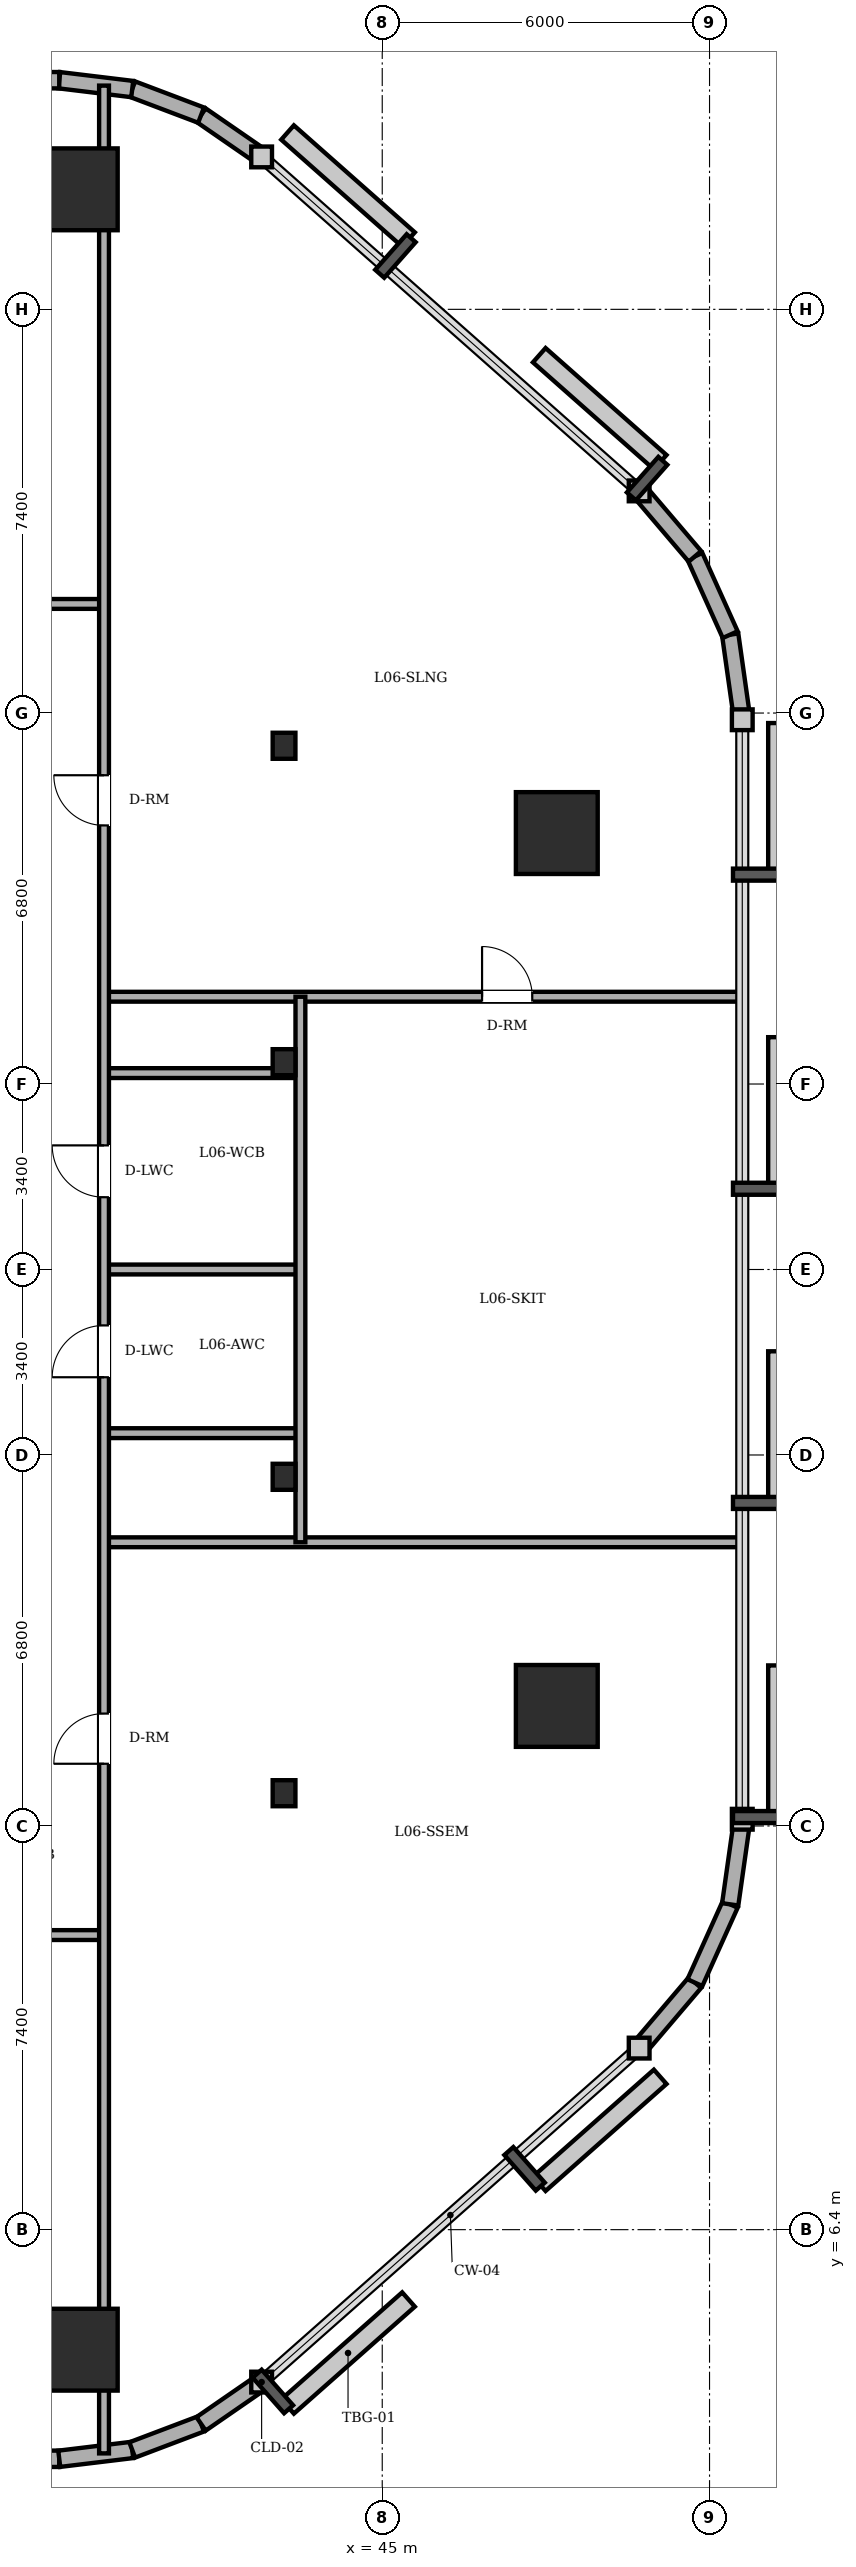
"""IFC4 building model, lengths in metres.
Left out: names, types, materials, properties, quantities, classifications, styles, units other than length and angle.
Written with IfcOpenShell. Run it as: python <this file> out.ifc"""

import sys

from ifc_helpers import new_model, si_unit, direction, frame, frame_2d, origin, origin_2d, place, context, subcontext, project, spatial, rectangle, circle, i_section, extrude, element, fill, save


model = new_model("IFC4")
c1 = context("Model", 3, precision=1e-05, world=origin(), true_north=direction((0.0, 1.0)))
c2 = subcontext(c1, "Body", "Model", "MODEL_VIEW")
j1 = project(units=[si_unit("LENGTHUNIT", "METRE"), si_unit("PLANEANGLEUNIT", "RADIAN")], contexts=[c1])
p1 = place(None, origin())
s1 = spatial("IfcSite", under=j1, at=p1, CompositionType="ELEMENT")
p2 = place(p1, origin())
s2 = spatial("IfcBuilding", under=s1, at=p2, CompositionType="ELEMENT")
p3 = place(p2, frame((0.0, 0.0, 24.0)))
s3 = spatial("IfcBuildingStorey", under=s2, at=p3, CompositionType="ELEMENT", Elevation=24.0)
for number, where, z_axis, x_axis in (
    (1, (39.4, 4.2, 0.0), (0.0, 0.0, 1.0), (1.0, 0.0, 0.0)),
    (2, (48.2, 16.0, 0.0), (0.0, 0.0, 1.0), (1.0, 0.0, 0.0)),
    (3, (48.2, 32.0, 0.0), (0.0, 0.0, 1.0), (1.0, 0.0, 0.0)),
    (4, (39.4, 43.8, 0.0), (0.0, 0.0, 1.0), (1.0, 0.0, 0.0)),
):
    element("IfcColumn", number, at=place(p3, frame(where, z_axis=z_axis, x_axis=x_axis)), inside=s3, PredefinedType="COLUMN", context=c2, shape_type="SweptSolid", body=[
        extrude(circle(Radius=0.75, at=origin_2d()), origin(), (0.0, 0.0, 1.0), 4.8),
    ])
for number, where, z_axis, x_axis in (
    (5, (43.2, 14.4, 0.0), (0.0, 0.0, 1.0), (1.0, 0.0, 0.0)),
    (6, (43.2, 20.2, 0.0), (0.0, 0.0, 1.0), (1.0, 0.0, 0.0)),
    (7, (43.2, 27.8, 0.0), (0.0, 0.0, 1.0), (1.0, 0.0, 0.0)),
    (8, (43.2, 33.6, 0.0), (0.0, 0.0, 1.0), (1.0, 0.0, 0.0)),
):
    element("IfcColumn", number, at=place(p3, frame(where, z_axis=z_axis, x_axis=x_axis)), inside=s3, PredefinedType="COLUMN", context=c2, shape_type="SweptSolid", body=[
        extrude(i_section(OverallWidth=0.417, OverallDepth=0.477, WebThickness=0.036, FlangeThickness=0.057, FilletRadius=0.015, at=origin_2d()), origin(), (0.0, 0.0, 1.0), 4.8),
    ])
p4 = place(p3, frame((9.0, 2.2, 0.0), z_axis=(0.0, 0.0, 1.0), x_axis=(1.0, 0.0, 0.0)))
e9 = element("IfcWall", 9, at=p4, inside=s3, PredefinedType="SOLIDWALL", context=c2, shape_type="SweptSolid", body=[
    extrude(rectangle(XDim=30.079, YDim=0.3, at=frame_2d((15.04, 0.0))), origin(), (0.0, 0.0, 1.0), 4.6),
])
p5 = place(p4, frame((8.537, 0.0, 0.0)))
e10 = element("IfcOpeningElement", 10, at=p5, cuts=e9, PredefinedType="OPENING", context=c2, shape_type="SweptSolid", body=[
    extrude(rectangle(XDim=0.95, YDim=2.2, at=frame_2d((0.475, 1.1))), frame((0.0, 0.16, 0.0), z_axis=(0.0, -1.0, 0.0), x_axis=(1.0, 0.0, 0.0)), (0.0, 0.0, 1.0), 0.32),
])
p6 = place(p4, frame((18.736, 0.0, 0.85)))
e11 = element("IfcOpeningElement", 11, at=p6, cuts=e9, PredefinedType="OPENING", context=c2, shape_type="SweptSolid", body=[
    extrude(rectangle(XDim=2.4, YDim=2.1, at=frame_2d((1.2, 1.05))), frame((0.0, 0.16, 0.0), z_axis=(0.0, -1.0, 0.0), x_axis=(1.0, 0.0, 0.0)), (0.0, 0.0, 1.0), 0.32),
])
p7 = place(p3, frame((39.079, 2.2, 0.0), z_axis=(0.0, 0.0, 1.0), x_axis=(0.992739027259, 0.120288086515, 0.0)))
e12 = element("IfcWall", 12, at=p7, inside=s3, PredefinedType="SOLIDWALL", context=c2, shape_type="SweptSolid", body=[
    extrude(rectangle(XDim=1.348, YDim=0.3, at=frame_2d((0.674, 0.0))), origin(), (0.0, 0.0, 1.0), 4.6),
])
p8 = place(p3, frame((40.417, 2.362, 0.0), z_axis=(0.0, 0.0, 1.0), x_axis=(0.935156721165, 0.354234254216, 0.0)))
e13 = element("IfcWall", 13, at=p8, inside=s3, PredefinedType="SOLIDWALL", context=c2, shape_type="SweptSolid", body=[
    extrude(rectangle(XDim=1.349, YDim=0.3, at=frame_2d((0.675, 0.0))), origin(), (0.0, 0.0, 1.0), 4.6),
])
p9 = place(p3, frame((41.679, 2.84, 0.0), z_axis=(0.0, 0.0, 1.0), x_axis=(0.823116500192, 0.567872544777, 0.0)))
e14 = element("IfcWall", 14, at=p9, inside=s3, PredefinedType="SOLIDWALL", context=c2, shape_type="SweptSolid", body=[
    extrude(rectangle(XDim=1.349, YDim=0.3, at=frame_2d((0.674, 0.0))), origin(), (0.0, 0.0, 1.0), 4.6),
])
p10 = place(p3, frame((49.71, 9.728, 0.0), z_axis=(0.0, 0.0, 1.0), x_axis=(0.648389989909, 0.7613083613, 0.0)))
e15 = element("IfcWall", 15, at=p10, inside=s3, PredefinedType="SOLIDWALL", context=c2, shape_type="SweptSolid", body=[
    extrude(rectangle(XDim=1.576, YDim=0.3, at=frame_2d((0.788, 0.0))), origin(), (0.0, 0.0, 1.0), 4.6),
])
p11 = place(p3, frame((50.732, 10.928, 0.0), z_axis=(0.0, 0.0, 1.0), x_axis=(0.410996558744, 0.911636895206, 0.0)))
e16 = element("IfcWall", 16, at=p11, inside=s3, PredefinedType="SOLIDWALL", context=c2, shape_type="SweptSolid", body=[
    extrude(rectangle(XDim=1.574, YDim=0.3, at=frame_2d((0.787, 0.0))), origin(), (0.0, 0.0, 1.0), 4.6),
])
for number, where, z_axis, x_axis in (
    (17, (51.379, 12.363, 0.0), (0.0, 0.0, 1.0), (0.14, 0.99, 0.0)),
    (18, (51.6, 34.077, 0.0), (0.0, 0.0, 1.0), (-0.14, 0.99, 0.0)),
):
    element("IfcWall", number, at=place(p3, frame(where, z_axis=z_axis, x_axis=x_axis)), inside=s3, PredefinedType="SOLIDWALL", context=c2, shape_type="SweptSolid", body=[
        extrude(rectangle(XDim=1.576, YDim=0.3, at=frame_2d((0.788, 0.0))), origin(), (0.0, 0.0, 1.0), 4.6),
    ])
p12 = place(p3, frame((51.379, 35.637, 0.0), z_axis=(0.0, 0.0, 1.0), x_axis=(-0.410996558744, 0.911636895206, 0.0)))
e19 = element("IfcWall", 19, at=p12, inside=s3, PredefinedType="SOLIDWALL", context=c2, shape_type="SweptSolid", body=[
    extrude(rectangle(XDim=1.574, YDim=0.3, at=frame_2d((0.787, 0.0))), origin(), (0.0, 0.0, 1.0), 4.6),
])
p13 = place(p3, frame((50.732, 37.072, 0.0), z_axis=(0.0, 0.0, 1.0), x_axis=(-0.648389989909, 0.7613083613, 0.0)))
e20 = element("IfcWall", 20, at=p13, inside=s3, PredefinedType="SOLIDWALL", context=c2, shape_type="SweptSolid", body=[
    extrude(rectangle(XDim=1.576, YDim=0.3, at=frame_2d((0.788, 0.0))), origin(), (0.0, 0.0, 1.0), 4.6),
])
p14 = place(p3, frame((42.789, 44.394, 0.0), z_axis=(0.0, 0.0, 1.0), x_axis=(-0.823116500192, 0.567872544777, 0.0)))
e21 = element("IfcWall", 21, at=p14, inside=s3, PredefinedType="SOLIDWALL", context=c2, shape_type="SweptSolid", body=[
    extrude(rectangle(XDim=1.349, YDim=0.3, at=frame_2d((0.674, 0.0))), origin(), (0.0, 0.0, 1.0), 4.6),
])
p15 = place(p3, frame((41.679, 45.16, 0.0), z_axis=(0.0, 0.0, 1.0), x_axis=(-0.935156721165, 0.354234254216, 0.0)))
e22 = element("IfcWall", 22, at=p15, inside=s3, PredefinedType="SOLIDWALL", context=c2, shape_type="SweptSolid", body=[
    extrude(rectangle(XDim=1.349, YDim=0.3, at=frame_2d((0.675, 0.0))), origin(), (0.0, 0.0, 1.0), 4.6),
])
p16 = place(p3, frame((40.417, 45.638, 0.0), z_axis=(0.0, 0.0, 1.0), x_axis=(-0.992739027259, 0.120288086515, 0.0)))
e23 = element("IfcWall", 23, at=p16, inside=s3, PredefinedType="SOLIDWALL", context=c2, shape_type="SweptSolid", body=[
    extrude(rectangle(XDim=1.348, YDim=0.3, at=frame_2d((0.674, 0.0))), origin(), (0.0, 0.0, 1.0), 4.6),
])
p17 = place(p3, frame((39.079, 45.8, 0.0), z_axis=(0.0, 0.0, 1.0), x_axis=(-1.0, 0.0, 0.0)))
e24 = element("IfcWall", 24, at=p17, inside=s3, PredefinedType="SOLIDWALL", context=c2, shape_type="SweptSolid", body=[
    extrude(rectangle(XDim=30.079, YDim=0.3, at=frame_2d((15.04, 0.0))), origin(), (0.0, 0.0, 1.0), 4.6),
])
p18 = place(p17, frame((23.717, 0.0, 0.0)))
e25 = element("IfcOpeningElement", 25, at=p18, cuts=e24, PredefinedType="OPENING", context=c2, shape_type="SweptSolid", body=[
    extrude(rectangle(XDim=0.95, YDim=2.2, at=frame_2d((0.475, 1.1))), frame((0.0, 0.16, 0.0), z_axis=(0.0, -1.0, 0.0), x_axis=(1.0, 0.0, 0.0)), (0.0, 0.0, 1.0), 0.32),
])
p19 = place(p17, frame((8.943, 0.0, 0.85)))
e26 = element("IfcOpeningElement", 26, at=p19, cuts=e24, PredefinedType="OPENING", context=c2, shape_type="SweptSolid", body=[
    extrude(rectangle(XDim=2.4, YDim=2.1, at=frame_2d((1.2, 1.05))), frame((0.0, 0.16, 0.0), z_axis=(0.0, -1.0, 0.0), x_axis=(1.0, 0.0, 0.0)), (0.0, 0.0, 1.0), 0.32),
])
p20 = place(p17, frame((18.736, 0.0, 0.85)))
e27 = element("IfcOpeningElement", 27, at=p20, cuts=e24, PredefinedType="OPENING", context=c2, shape_type="SweptSolid", body=[
    extrude(rectangle(XDim=2.4, YDim=2.1, at=frame_2d((1.2, 1.05))), frame((0.0, 0.16, 0.0), z_axis=(0.0, -1.0, 0.0), x_axis=(1.0, 0.0, 0.0)), (0.0, 0.0, 1.0), 0.32),
])
p21 = place(p3, frame((11.0, 11.8, 0.0), z_axis=(0.0, 0.0, 1.0), x_axis=(1.0, 0.0, 0.0)))
e28 = element("IfcWall", 28, at=p21, inside=s3, PredefinedType="PARTITIONING", context=c2, shape_type="SweptSolid", body=[
    extrude(rectangle(XDim=28.9, YDim=0.18, at=frame_2d((14.45, 0.0))), origin(), (0.0, 0.0, 1.0), 4.6),
])
p22 = place(p21, frame((18.05, 0.0, 0.0)))
e29 = element("IfcOpeningElement", 29, at=p22, cuts=e28, PredefinedType="OPENING", context=c2, shape_type="SweptSolid", body=[
    extrude(rectangle(XDim=0.9, YDim=2.05, at=frame_2d((0.45, 1.025))), frame((0.0, 0.1, 0.0), z_axis=(0.0, -1.0, 0.0), x_axis=(1.0, 0.0, 0.0)), (0.0, 0.0, 1.0), 0.2),
])
p23 = place(p3, frame((39.9, 19.0, 0.0), z_axis=(0.0, 0.0, 1.0), x_axis=(1.0, 0.0, 0.0)))
e30 = element("IfcWall", 30, at=p23, inside=s3, PredefinedType="PARTITIONING", context=c2, shape_type="SweptSolid", body=[
    extrude(rectangle(XDim=11.7, YDim=0.18, at=frame_2d((5.85, 0.0))), origin(), (0.0, 0.0, 1.0), 4.6),
])
p24 = place(p3, frame((39.9, 21.0, 0.0), z_axis=(0.0, 0.0, 1.0), x_axis=(1.0, 0.0, 0.0)))
e31 = element("IfcWall", 31, at=p24, inside=s3, PredefinedType="PARTITIONING", context=c2, shape_type="SweptSolid", body=[
    extrude(rectangle(XDim=3.6, YDim=0.18, at=frame_2d((1.8, 0.0))), origin(), (0.0, 0.0, 1.0), 4.312),
])
p25 = place(p3, frame((39.9, 24.0, 0.0), z_axis=(0.0, 0.0, 1.0), x_axis=(1.0, 0.0, 0.0)))
e32 = element("IfcWall", 32, at=p25, inside=s3, PredefinedType="PARTITIONING", context=c2, shape_type="SweptSolid", body=[
    extrude(rectangle(XDim=3.6, YDim=0.18, at=frame_2d((1.8, 0.0))), origin(), (0.0, 0.0, 1.0), 4.252),
])
p26 = place(p3, frame((39.9, 27.6, 0.0), z_axis=(0.0, 0.0, 1.0), x_axis=(1.0, 0.0, 0.0)))
e33 = element("IfcWall", 33, at=p26, inside=s3, PredefinedType="PARTITIONING", context=c2, shape_type="SweptSolid", body=[
    extrude(rectangle(XDim=3.6, YDim=0.18, at=frame_2d((1.8, 0.0))), origin(), (0.0, 0.0, 1.0), 3.982),
])
p27 = place(p3, frame((39.9, 29.0, 0.0), z_axis=(0.0, 0.0, 1.0), x_axis=(1.0, 0.0, 0.0)))
e34 = element("IfcWall", 34, at=p27, inside=s3, PredefinedType="PARTITIONING", context=c2, shape_type="SweptSolid", body=[
    extrude(rectangle(XDim=11.7, YDim=0.18, at=frame_2d((5.85, 0.0))), origin(), (0.0, 0.0, 1.0), 4.6),
])
p28 = place(p27, frame((6.93, 0.0, 0.0)))
e35 = element("IfcOpeningElement", 35, at=p28, cuts=e34, PredefinedType="OPENING", context=c2, shape_type="SweptSolid", body=[
    extrude(rectangle(XDim=0.92, YDim=2.1, at=frame_2d((0.46, 1.05))), frame((0.0, 0.1, 0.0), z_axis=(0.0, -1.0, 0.0), x_axis=(1.0, 0.0, 0.0)), (0.0, 0.0, 1.0), 0.2),
])
p29 = place(p3, frame((11.0, 36.2, 0.0), z_axis=(0.0, 0.0, 1.0), x_axis=(1.0, 0.0, 0.0)))
e36 = element("IfcWall", 36, at=p29, inside=s3, PredefinedType="PARTITIONING", context=c2, shape_type="SweptSolid", body=[
    extrude(rectangle(XDim=28.9, YDim=0.18, at=frame_2d((14.45, 0.0))), origin(), (0.0, 0.0, 1.0), 4.6),
])
p30 = place(p3, frame((39.9, 2.299, 0.0), z_axis=(0.0, 0.0, 1.0), x_axis=(0.0, 1.0, 0.0)))
e37 = element("IfcWall", 37, at=p30, inside=s3, PredefinedType="PARTITIONING", context=c2, shape_type="SweptSolid", body=[
    extrude(rectangle(XDim=43.402, YDim=0.18, at=frame_2d((21.701, 0.0))), origin(), (0.0, 0.0, 1.0), 3.982),
])
p31 = place(p30, frame((19.726, 0.0, 0.0)))
e38 = element("IfcOpeningElement", 38, at=p31, cuts=e37, PredefinedType="OPENING", context=c2, shape_type="SweptSolid", body=[
    extrude(rectangle(XDim=0.95, YDim=2.15, at=frame_2d((0.475, 1.075))), frame((0.0, 0.1, 0.0), z_axis=(0.0, -1.0, 0.0), x_axis=(1.0, 0.0, 0.0)), (0.0, 0.0, 1.0), 0.2),
])
p32 = place(p30, frame((23.026, 0.0, 0.0)))
e39 = element("IfcOpeningElement", 39, at=p32, cuts=e37, PredefinedType="OPENING", context=c2, shape_type="SweptSolid", body=[
    extrude(rectangle(XDim=0.95, YDim=2.15, at=frame_2d((0.475, 1.075))), frame((0.0, 0.1, 0.0), z_axis=(0.0, -1.0, 0.0), x_axis=(1.0, 0.0, 0.0)), (0.0, 0.0, 1.0), 0.2),
])
p33 = place(p30, frame((29.841, 0.0, 0.0)))
e40 = element("IfcOpeningElement", 40, at=p33, cuts=e37, PredefinedType="OPENING", context=c2, shape_type="SweptSolid", body=[
    extrude(rectangle(XDim=0.92, YDim=2.1, at=frame_2d((0.46, 1.05))), frame((0.0, 0.1, 0.0), z_axis=(0.0, -1.0, 0.0), x_axis=(1.0, 0.0, 0.0)), (0.0, 0.0, 1.0), 0.2),
])
p34 = place(p30, frame((12.641, 0.0, 0.0)))
e41 = element("IfcOpeningElement", 41, at=p34, cuts=e37, PredefinedType="OPENING", context=c2, shape_type="SweptSolid", body=[
    extrude(rectangle(XDim=0.92, YDim=2.1, at=frame_2d((0.46, 1.05))), frame((0.0, 0.1, 0.0), z_axis=(0.0, -1.0, 0.0), x_axis=(1.0, 0.0, 0.0)), (0.0, 0.0, 1.0), 0.2),
])
p35 = place(p3, frame((43.5, 19.0, 0.0), z_axis=(0.0, 0.0, 1.0), x_axis=(0.0, 1.0, 0.0)))
e42 = element("IfcWall", 42, at=p35, inside=s3, PredefinedType="PARTITIONING", context=c2, shape_type="SweptSolid", body=[
    extrude(rectangle(XDim=10.0, YDim=0.18, at=frame_2d((5.0, 0.0))), origin(), (0.0, 0.0, 1.0), 4.6),
])
p36 = place(p31, origin())
e43 = element("IfcDoor", 43, at=p36, inside=s3, OperationType="SINGLE_SWING_LEFT", PredefinedType="DOOR", context=c2, shape_type="SweptSolid", body=[
    extrude(rectangle(XDim=0.95, YDim=2.15, at=frame_2d((0.475, 1.075))), frame((0.0, 0.025, 0.0), z_axis=(0.0, -1.0, 0.0), x_axis=(1.0, 0.0, 0.0)), (0.0, 0.0, 1.0), 0.05),
])
fill(e38, e43)
p37 = place(p32, origin())
e44 = element("IfcDoor", 44, at=p37, inside=s3, OperationType="SINGLE_SWING_RIGHT", PredefinedType="DOOR", context=c2, shape_type="SweptSolid", body=[
    extrude(rectangle(XDim=0.95, YDim=2.15, at=frame_2d((0.475, 1.075))), frame((0.0, 0.025, 0.0), z_axis=(0.0, -1.0, 0.0), x_axis=(1.0, 0.0, 0.0)), (0.0, 0.0, 1.0), 0.05),
])
fill(e39, e44)
p38 = place(p33, origin())
e45 = element("IfcDoor", 45, at=p38, inside=s3, OperationType="SINGLE_SWING_RIGHT", PredefinedType="DOOR", context=c2, shape_type="SweptSolid", body=[
    extrude(rectangle(XDim=0.92, YDim=2.1, at=frame_2d((0.46, 1.05))), frame((0.0, 0.025, 0.0), z_axis=(0.0, -1.0, 0.0), x_axis=(1.0, 0.0, 0.0)), (0.0, 0.0, 1.0), 0.05),
])
fill(e40, e45)
p39 = place(p34, origin())
e46 = element("IfcDoor", 46, at=p39, inside=s3, OperationType="SINGLE_SWING_LEFT", PredefinedType="DOOR", context=c2, shape_type="SweptSolid", body=[
    extrude(rectangle(XDim=0.92, YDim=2.1, at=frame_2d((0.46, 1.05))), frame((0.0, 0.025, 0.0), z_axis=(0.0, -1.0, 0.0), x_axis=(1.0, 0.0, 0.0)), (0.0, 0.0, 1.0), 0.05),
])
fill(e41, e46)
p40 = place(p28, origin())
e47 = element("IfcDoor", 47, at=p40, inside=s3, OperationType="SINGLE_SWING_LEFT", PredefinedType="DOOR", context=c2, shape_type="SweptSolid", body=[
    extrude(rectangle(XDim=0.92, YDim=2.1, at=frame_2d((0.46, 1.05))), frame((0.0, 0.025, 0.0), z_axis=(0.0, -1.0, 0.0), x_axis=(1.0, 0.0, 0.0)), (0.0, 0.0, 1.0), 0.05),
])
fill(e35, e47)
save(model, sys.argv[1])
